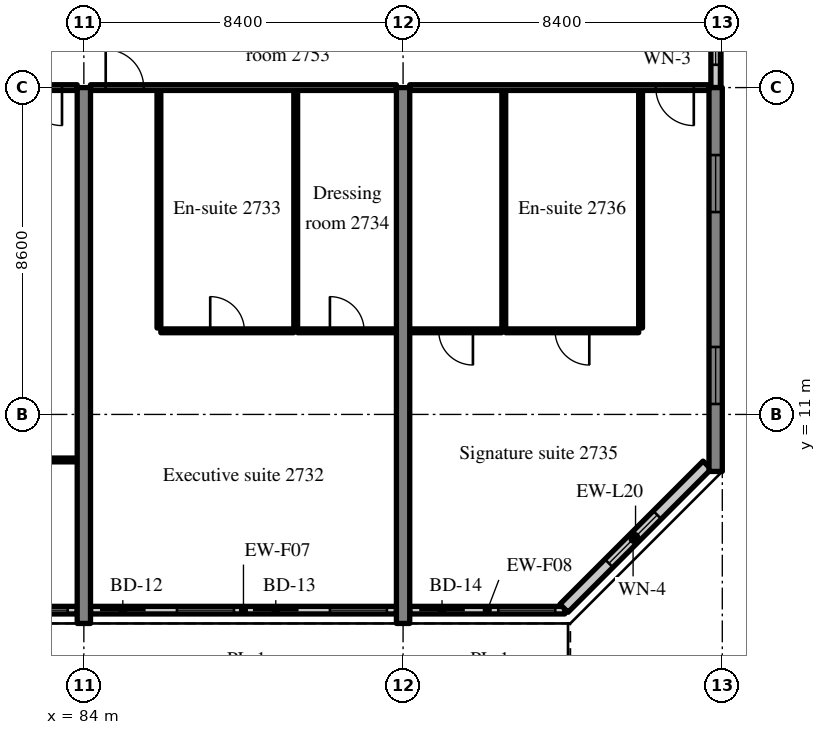
"""IFC4 building model, lengths in metres.
Left out: names, types, materials, properties, quantities, classifications, styles, units other than length and angle.
Written with IfcOpenShell. Run it as: python <this file> out.ifc"""

import sys

from ifc_helpers import new_model, si_unit, direction, frame, frame_2d, origin, place, context, subcontext, project, spatial, rectangle, extrude, source, transform, mapped, element, fill, save


model = new_model("IFC4")
c1 = context("Model", 3, precision=1e-05, world=origin(), true_north=direction((0.0, 1.0)))
c2 = subcontext(c1, "Body", "Model", "MODEL_VIEW")
j1 = project(units=[si_unit("LENGTHUNIT", "METRE"), si_unit("PLANEANGLEUNIT", "RADIAN")], contexts=[c1])
p1 = place(None, origin())
s1 = spatial("IfcSite", under=j1, at=p1, CompositionType="ELEMENT")
p2 = place(p1, origin())
s2 = spatial("IfcBuilding", under=s1, at=p2, CompositionType="ELEMENT")
p3 = place(p2, frame((0.0, 0.0, 114.2)))
s3 = spatial("IfcBuildingStorey", under=s2, at=p3, CompositionType="ELEMENT", Elevation=114.2)
m1 = source(origin(), c2, "Body", "SweptSolid", [
    extrude(rectangle(XDim=14.1, YDim=0.35, at=frame_2d((7.05, 0.0))), origin(), (0.0, 0.0, 1.0), 3.52),
])
for number, where, z_axis, x_axis in (
    (1, (84.0, 5.5, 0.0), (0.0, 0.0, 1.0), (0.0, 1.0, 0.0)),
    (2, (92.4, 5.5, 0.0), (0.0, 0.0, 1.0), (0.0, 1.0, 0.0)),
):
    element("IfcWall", number, at=place(p3, frame(where, z_axis=z_axis, x_axis=x_axis)), inside=s3, PredefinedType="SHEAR", context=c2, shape_type="MappedRepresentation", body=[
        mapped(m1, transform((0.0, 0.0, 0.0), scale=1.0)),
    ])
m2 = source(origin(), c2, "Body", "SweptSolid", [
    extrude(rectangle(XDim=10.1, YDim=0.35, at=frame_2d((5.05, 0.0))), origin(), (0.0, 0.0, 1.0), 3.52),
])
p4 = place(p3, frame((100.625, 9.5, 0.0), z_axis=(0.0, 0.0, 1.0), x_axis=(0.0, 1.0, 0.0)))
e3 = element("IfcWall", 3, at=p4, inside=s3, PredefinedType="SHEAR", context=c2, shape_type="MappedRepresentation", body=[
    mapped(m2, transform((0.0, 0.0, 0.0), scale=1.0)),
])
m3 = source(origin(), c2, "Body", "SweptSolid", [
    extrude(rectangle(XDim=1.5, YDim=1.5, at=frame_2d((0.75, 0.75))), frame((0.0, 0.185, 0.0), z_axis=(0.0, -1.0, 0.0), x_axis=(1.0, 0.0, 0.0)), (0.0, 0.0, 1.0), 0.37),
])
p5 = place(p4, frame((1.775, 0.0, 0.9)))
e4 = element("IfcOpeningElement", 4, at=p5, cuts=e3, PredefinedType="OPENING", context=c2, shape_type="MappedRepresentation", body=[
    mapped(m3, transform((0.0, 0.0, 0.0), scale=1.0)),
])
p6 = place(p4, frame((6.825, 0.0, 0.9)))
e5 = element("IfcOpeningElement", 5, at=p6, cuts=e3, PredefinedType="OPENING", context=c2, shape_type="MappedRepresentation", body=[
    mapped(m3, transform((0.0, 0.0, 0.0), scale=1.0)),
])
m4 = source(origin(), c2, "Body", "SweptSolid", [
    extrude(rectangle(XDim=8.05, YDim=0.2, at=frame_2d((4.025, 0.0))), origin(), (0.0, 0.0, 1.0), 2.82),
])
p7 = place(p3, frame((75.775, 5.85, 0.0), z_axis=(0.0, 0.0, 1.0), x_axis=(1.0, 0.0, 0.0)))
e6 = element("IfcWall", 6, at=p7, inside=s3, PredefinedType="SOLIDWALL", context=c2, shape_type="MappedRepresentation", body=[
    mapped(m4, transform((0.0, 0.0, 0.0), scale=1.0)),
])
m5 = source(origin(), c2, "Body", "SweptSolid", [
    extrude(rectangle(XDim=1.2, YDim=2.4, at=frame_2d((0.6, 1.2))), frame((0.0, 0.11, 0.0), z_axis=(0.0, -1.0, 0.0), x_axis=(1.0, 0.0, 0.0)), (0.0, 0.0, 1.0), 0.22),
])
p8 = place(p7, frame((0.25, 0.0, 0.0)))
e7 = element("IfcOpeningElement", 7, at=p8, cuts=e6, PredefinedType="OPENING", context=c2, shape_type="MappedRepresentation", body=[
    mapped(m5, transform((0.0, 0.0, 0.0), scale=1.0)),
])
m6 = source(origin(), c2, "Body", "SweptSolid", [
    extrude(rectangle(XDim=1.5, YDim=1.5, at=frame_2d((0.75, 0.75))), frame((0.0, 0.11, 0.0), z_axis=(0.0, -1.0, 0.0), x_axis=(1.0, 0.0, 0.0)), (0.0, 0.0, 1.0), 0.22),
])
p9 = place(p7, frame((2.275, 0.0, 0.9)))
e8 = element("IfcOpeningElement", 8, at=p9, cuts=e6, PredefinedType="OPENING", context=c2, shape_type="MappedRepresentation", body=[
    mapped(m6, transform((0.0, 0.0, 0.0), scale=1.0)),
])
p10 = place(p7, frame((4.275, 0.0, 0.0)))
e9 = element("IfcOpeningElement", 9, at=p10, cuts=e6, PredefinedType="OPENING", context=c2, shape_type="MappedRepresentation", body=[
    mapped(m5, transform((0.0, 0.0, 0.0), scale=1.0)),
])
p11 = place(p7, frame((6.3, 0.0, 0.9)))
e10 = element("IfcOpeningElement", 10, at=p11, cuts=e6, PredefinedType="OPENING", context=c2, shape_type="MappedRepresentation", body=[
    mapped(m6, transform((0.0, 0.0, 0.0), scale=1.0)),
])
p12 = place(p3, frame((84.175, 5.85, 0.0), z_axis=(0.0, 0.0, 1.0), x_axis=(1.0, 0.0, 0.0)))
e11 = element("IfcWall", 11, at=p12, inside=s3, PredefinedType="SOLIDWALL", context=c2, shape_type="MappedRepresentation", body=[
    mapped(m4, transform((0.0, 0.0, 0.0), scale=1.0)),
])
p13 = place(p12, frame((0.25, 0.0, 0.0)))
e12 = element("IfcOpeningElement", 12, at=p13, cuts=e11, PredefinedType="OPENING", context=c2, shape_type="MappedRepresentation", body=[
    mapped(m5, transform((0.0, 0.0, 0.0), scale=1.0)),
])
p14 = place(p12, frame((2.275, 0.0, 0.9)))
e13 = element("IfcOpeningElement", 13, at=p14, cuts=e11, PredefinedType="OPENING", context=c2, shape_type="MappedRepresentation", body=[
    mapped(m6, transform((0.0, 0.0, 0.0), scale=1.0)),
])
p15 = place(p12, frame((4.275, 0.0, 0.0)))
e14 = element("IfcOpeningElement", 14, at=p15, cuts=e11, PredefinedType="OPENING", context=c2, shape_type="MappedRepresentation", body=[
    mapped(m5, transform((0.0, 0.0, 0.0), scale=1.0)),
])
p16 = place(p12, frame((6.3, 0.0, 0.9)))
e15 = element("IfcOpeningElement", 15, at=p16, cuts=e11, PredefinedType="OPENING", context=c2, shape_type="MappedRepresentation", body=[
    mapped(m6, transform((0.0, 0.0, 0.0), scale=1.0)),
])
m7 = source(origin(), c2, "Body", "SweptSolid", [
    extrude(rectangle(XDim=4.08, YDim=0.2, at=frame_2d((2.04, 0.0))), origin(), (0.0, 0.0, 1.0), 2.82),
])
p17 = place(p3, frame((92.575, 5.85, 0.0), z_axis=(0.0, 0.0, 1.0), x_axis=(1.0, 0.0, 0.0)))
e16 = element("IfcWall", 16, at=p17, inside=s3, PredefinedType="SOLIDWALL", context=c2, shape_type="MappedRepresentation", body=[
    mapped(m7, transform((0.0, 0.0, 0.0), scale=1.0)),
])
p18 = place(p17, frame((0.25, 0.0, 0.0)))
e17 = element("IfcOpeningElement", 17, at=p18, cuts=e16, PredefinedType="OPENING", context=c2, shape_type="MappedRepresentation", body=[
    mapped(m5, transform((0.0, 0.0, 0.0), scale=1.0)),
])
p19 = place(p17, frame((2.33, 0.0, 0.9)))
e18 = element("IfcOpeningElement", 18, at=p19, cuts=e16, PredefinedType="OPENING", context=c2, shape_type="MappedRepresentation", body=[
    mapped(m6, transform((0.0, 0.0, 0.0), scale=1.0)),
])
m8 = source(origin(), c2, "Body", "SweptSolid", [
    extrude(rectangle(XDim=5.326, YDim=0.3, at=frame_2d((2.663, 0.0))), origin(), (0.0, 0.0, 1.0), 3.52),
])
p20 = place(p3, frame((96.634, 5.9, 0.0), z_axis=(0.0, 0.0, 1.0), x_axis=(0.707083859269, 0.707129702361, 0.0)))
e19 = element("IfcWall", 19, at=p20, inside=s3, PredefinedType="SOLIDWALL", context=c2, shape_type="MappedRepresentation", body=[
    mapped(m8, transform((0.0, 0.0, 0.0), scale=1.0)),
])
m9 = source(origin(), c2, "Body", "SweptSolid", [
    extrude(rectangle(XDim=1.8, YDim=1.5, at=frame_2d((0.9, 0.75))), frame((0.0, 0.16, 0.0), z_axis=(0.0, -1.0, 0.0), x_axis=(1.0, 0.0, 0.0)), (0.0, 0.0, 1.0), 0.32),
])
p21 = place(p20, frame((1.672, 0.0, 0.9)))
e20 = element("IfcOpeningElement", 20, at=p21, cuts=e19, PredefinedType="OPENING", context=c2, shape_type="MappedRepresentation", body=[
    mapped(m9, transform((0.0, 0.0, 0.0), scale=1.0)),
])
m10 = source(origin(), c2, "Body", "SweptSolid", [
    extrude(rectangle(XDim=2.4, YDim=0.25, at=frame_2d((1.2, 0.0))), origin(), (0.0, 0.0, 1.0), 2.62),
])
p22 = place(p3, frame((100.625, 19.6, 0.0), z_axis=(0.0, 0.0, 1.0), x_axis=(0.0, 1.0, 0.0)))
e21 = element("IfcWall", 21, at=p22, inside=s3, PredefinedType="SOLIDWALL", context=c2, shape_type="MappedRepresentation", body=[
    mapped(m10, transform((0.0, 0.0, 0.0), scale=1.0)),
])
m11 = source(origin(), c2, "Body", "SweptSolid", [
    extrude(rectangle(XDim=1.2, YDim=1.5, at=frame_2d((0.6, 0.75))), frame((0.0, 0.135, 0.0), z_axis=(0.0, -1.0, 0.0), x_axis=(1.0, 0.0, 0.0)), (0.0, 0.0, 1.0), 0.27),
])
p23 = place(p22, frame((0.6, 0.0, 0.9)))
e22 = element("IfcOpeningElement", 22, at=p23, cuts=e21, PredefinedType="OPENING", context=c2, shape_type="MappedRepresentation", body=[
    mapped(m11, transform((0.0, 0.0, 0.0), scale=1.0)),
])
m12 = source(origin(), c2, "Body", "SweptSolid", [
    extrude(rectangle(XDim=8.05, YDim=0.1, at=frame_2d((4.025, 0.0))), origin(), (0.0, 0.0, 1.0), 3.52),
])
p24 = place(p3, frame((75.775, 9.802, 0.0), z_axis=(0.0, 0.0, 1.0), x_axis=(1.0, 0.0, 0.0)))
e23 = element("IfcWall", 23, at=p24, inside=s3, PredefinedType="PARTITIONING", context=c2, shape_type="MappedRepresentation", body=[
    mapped(m12, transform((0.0, 0.0, 0.0), scale=1.0)),
])
m13 = source(origin(), c2, "Body", "SweptSolid", [
    extrude(rectangle(XDim=1.8, YDim=2.1, at=frame_2d((0.9, 1.05))), frame((0.0, 0.06, 0.0), z_axis=(0.0, -1.0, 0.0), x_axis=(1.0, 0.0, 0.0)), (0.0, 0.0, 1.0), 0.12),
])
p25 = place(p24, frame((3.125, 0.0, 0.0)))
e24 = element("IfcOpeningElement", 24, at=p25, cuts=e23, PredefinedType="OPENING", context=c2, shape_type="MappedRepresentation", body=[
    mapped(m13, transform((0.0, 0.0, 0.0), scale=1.0)),
])
m14 = source(origin(), c2, "Body", "SweptSolid", [
    extrude(rectangle(XDim=8.05, YDim=0.15, at=frame_2d((4.025, 0.0))), origin(), (0.0, 0.0, 1.0), 2.82),
])
p26 = place(p3, frame((75.775, 19.6, 0.0), z_axis=(0.0, 0.0, 1.0), x_axis=(1.0, 0.0, 0.0)))
e25 = element("IfcWall", 25, at=p26, inside=s3, PredefinedType="PARTITIONING", context=c2, shape_type="MappedRepresentation", body=[
    mapped(m14, transform((0.0, 0.0, 0.0), scale=1.0)),
])
m15 = source(origin(), c2, "Body", "SweptSolid", [
    extrude(rectangle(XDim=1.0, YDim=2.1, at=frame_2d((0.5, 1.05))), frame((0.0, 0.085, 0.0), z_axis=(0.0, -1.0, 0.0), x_axis=(1.0, 0.0, 0.0)), (0.0, 0.0, 1.0), 0.17),
])
p27 = place(p26, frame((6.65, 0.0, 0.0)))
e26 = element("IfcOpeningElement", 26, at=p27, cuts=e25, PredefinedType="OPENING", context=c2, shape_type="MappedRepresentation", body=[
    mapped(m15, transform((0.0, 0.0, 0.0), scale=1.0)),
])
m16 = source(origin(), c2, "Body", "SweptSolid", [
    extrude(rectangle(XDim=6.25, YDim=0.1, at=frame_2d((3.125, 0.0))), origin(), (0.0, 0.0, 1.0), 3.52),
])
for number, where, z_axis, x_axis in (
    (27, (85.975, 13.275, 0.0), (0.0, 0.0, 1.0), (0.0, 1.0, 0.0)),
    (28, (89.575, 13.275, 0.0), (0.0, 0.0, 1.0), (0.0, 1.0, 0.0)),
):
    element("IfcWall", number, at=place(p3, frame(where, z_axis=z_axis, x_axis=x_axis)), inside=s3, PredefinedType="PARTITIONING", context=c2, shape_type="MappedRepresentation", body=[
        mapped(m16, transform((0.0, 0.0, 0.0), scale=1.0)),
    ])
m17 = source(origin(), c2, "Body", "SweptSolid", [
    extrude(rectangle(XDim=3.5, YDim=0.1, at=frame_2d((1.75, 0.0))), origin(), (0.0, 0.0, 1.0), 3.52),
])
p28 = place(p3, frame((86.025, 13.2, 0.0), z_axis=(0.0, 0.0, 1.0), x_axis=(1.0, 0.0, 0.0)))
e29 = element("IfcWall", 29, at=p28, inside=s3, PredefinedType="PARTITIONING", context=c2, shape_type="MappedRepresentation", body=[
    mapped(m17, transform((0.0, 0.0, 0.0), scale=1.0)),
])
m18 = source(origin(), c2, "Body", "SweptSolid", [
    extrude(rectangle(XDim=0.9, YDim=2.1, at=frame_2d((0.45, 1.05))), frame((0.0, 0.06, 0.0), z_axis=(0.0, -1.0, 0.0), x_axis=(1.0, 0.0, 0.0)), (0.0, 0.0, 1.0), 0.12),
])
p29 = place(p28, frame((1.3, 0.0, 0.0)))
e30 = element("IfcOpeningElement", 30, at=p29, cuts=e29, PredefinedType="OPENING", context=c2, shape_type="MappedRepresentation", body=[
    mapped(m18, transform((0.0, 0.0, 0.0), scale=1.0)),
])
m19 = source(origin(), c2, "Body", "SweptSolid", [
    extrude(rectangle(XDim=2.6, YDim=0.1, at=frame_2d((1.3, 0.0))), origin(), (0.0, 0.0, 1.0), 3.52),
])
p30 = place(p3, frame((89.625, 13.2, 0.0), z_axis=(0.0, 0.0, 1.0), x_axis=(1.0, 0.0, 0.0)))
e31 = element("IfcWall", 31, at=p30, inside=s3, PredefinedType="PARTITIONING", context=c2, shape_type="MappedRepresentation", body=[
    mapped(m19, transform((0.0, 0.0, 0.0), scale=1.0)),
])
p31 = place(p30, frame((0.85, 0.0, 0.0)))
e32 = element("IfcOpeningElement", 32, at=p31, cuts=e31, PredefinedType="OPENING", context=c2, shape_type="MappedRepresentation", body=[
    mapped(m18, transform((0.0, 0.0, 0.0), scale=1.0)),
])
p32 = place(p3, frame((84.175, 19.6, 0.0), z_axis=(0.0, 0.0, 1.0), x_axis=(1.0, 0.0, 0.0)))
e33 = element("IfcWall", 33, at=p32, inside=s3, PredefinedType="PARTITIONING", context=c2, shape_type="MappedRepresentation", body=[
    mapped(m14, transform((0.0, 0.0, 0.0), scale=1.0)),
])
p33 = place(p32, frame((0.4, 0.0, 0.0)))
e34 = element("IfcOpeningElement", 34, at=p33, cuts=e33, PredefinedType="OPENING", context=c2, shape_type="MappedRepresentation", body=[
    mapped(m15, transform((0.0, 0.0, 0.0), scale=1.0)),
])
for number, where, z_axis, x_axis in (
    (35, (98.65, 13.275, 0.0), (0.0, 0.0, 1.0), (0.0, 1.0, 0.0)),
    (36, (95.05, 13.275, 0.0), (0.0, 0.0, 1.0), (0.0, 1.0, 0.0)),
):
    element("IfcWall", number, at=place(p3, frame(where, z_axis=z_axis, x_axis=x_axis)), inside=s3, PredefinedType="PARTITIONING", context=c2, shape_type="MappedRepresentation", body=[
        mapped(m16, transform((0.0, 0.0, 0.0), scale=1.0)),
    ])
p34 = place(p3, frame((95.1, 13.2, 0.0), z_axis=(0.0, 0.0, 1.0), x_axis=(1.0, 0.0, 0.0)))
e37 = element("IfcWall", 37, at=p34, inside=s3, PredefinedType="PARTITIONING", context=c2, shape_type="MappedRepresentation", body=[
    mapped(m17, transform((0.0, 0.0, 0.0), scale=1.0)),
])
p35 = place(p34, frame((1.3, 0.0, 0.0)))
e38 = element("IfcOpeningElement", 38, at=p35, cuts=e37, PredefinedType="OPENING", context=c2, shape_type="MappedRepresentation", body=[
    mapped(m18, transform((0.0, 0.0, 0.0), scale=1.0)),
])
m20 = source(origin(), c2, "Body", "SweptSolid", [
    extrude(rectangle(XDim=2.425, YDim=0.1, at=frame_2d((1.212, 0.0))), origin(), (0.0, 0.0, 1.0), 3.52),
])
p36 = place(p3, frame((92.575, 13.2, 0.0), z_axis=(0.0, 0.0, 1.0), x_axis=(1.0, 0.0, 0.0)))
e39 = element("IfcWall", 39, at=p36, inside=s3, PredefinedType="PARTITIONING", context=c2, shape_type="MappedRepresentation", body=[
    mapped(m20, transform((0.0, 0.0, 0.0), scale=1.0)),
])
p37 = place(p36, frame((0.763, 0.0, 0.0)))
e40 = element("IfcOpeningElement", 40, at=p37, cuts=e39, PredefinedType="OPENING", context=c2, shape_type="MappedRepresentation", body=[
    mapped(m18, transform((0.0, 0.0, 0.0), scale=1.0)),
])
m21 = source(origin(), c2, "Body", "SweptSolid", [
    extrude(rectangle(XDim=7.875, YDim=0.15, at=frame_2d((3.938, 0.0))), origin(), (0.0, 0.0, 1.0), 2.82),
])
p38 = place(p3, frame((92.575, 19.6, 0.0), z_axis=(0.0, 0.0, 1.0), x_axis=(1.0, 0.0, 0.0)))
e41 = element("IfcWall", 41, at=p38, inside=s3, PredefinedType="PARTITIONING", context=c2, shape_type="MappedRepresentation", body=[
    mapped(m21, transform((0.0, 0.0, 0.0), scale=1.0)),
])
p39 = place(p38, frame((6.475, 0.0, 0.0)))
e42 = element("IfcOpeningElement", 42, at=p39, cuts=e41, PredefinedType="OPENING", context=c2, shape_type="MappedRepresentation", body=[
    mapped(m15, transform((0.0, 0.0, 0.0), scale=1.0)),
])
m22 = source(origin(), c2, "Body", "SweptSolid", [
    extrude(rectangle(XDim=1.5, YDim=1.5, at=frame_2d((0.75, 0.75))), frame((0.0, 0.03, 0.0), z_axis=(0.0, -1.0, 0.0), x_axis=(1.0, 0.0, 0.0)), (0.0, 0.0, 1.0), 0.06),
])
p40 = place(p11, origin())
e43 = element("IfcWindow", 43, at=p40, inside=s3, PartitioningType="SINGLE_PANEL", PredefinedType="WINDOW", context=c2, shape_type="MappedRepresentation", body=[
    mapped(m22, transform((0.0, 0.0, 0.0), scale=1.0)),
])
fill(e10, e43)
m23 = source(origin(), c2, "Body", "SweptSolid", [
    extrude(rectangle(XDim=1.2, YDim=2.4, at=frame_2d((0.6, 1.2))), frame((0.0, 0.025, 0.0), z_axis=(0.0, -1.0, 0.0), x_axis=(1.0, 0.0, 0.0)), (0.0, 0.0, 1.0), 0.05),
])
p41 = place(p13, origin())
e44 = element("IfcDoor", 44, at=p41, inside=s3, OperationType="SLIDING_TO_RIGHT", PredefinedType="DOOR", context=c2, shape_type="MappedRepresentation", body=[
    mapped(m23, transform((0.0, 0.0, 0.0), scale=1.0)),
])
fill(e12, e44)
p42 = place(p14, origin())
e45 = element("IfcWindow", 45, at=p42, inside=s3, PartitioningType="SINGLE_PANEL", PredefinedType="WINDOW", context=c2, shape_type="MappedRepresentation", body=[
    mapped(m22, transform((0.0, 0.0, 0.0), scale=1.0)),
])
fill(e13, e45)
p43 = place(p15, origin())
e46 = element("IfcDoor", 46, at=p43, inside=s3, OperationType="SLIDING_TO_LEFT", PredefinedType="DOOR", context=c2, shape_type="MappedRepresentation", body=[
    mapped(m23, transform((0.0, 0.0, 0.0), scale=1.0)),
])
fill(e14, e46)
p44 = place(p16, origin())
e47 = element("IfcWindow", 47, at=p44, inside=s3, PartitioningType="SINGLE_PANEL", PredefinedType="WINDOW", context=c2, shape_type="MappedRepresentation", body=[
    mapped(m22, transform((0.0, 0.0, 0.0), scale=1.0)),
])
fill(e15, e47)
p45 = place(p18, origin())
e48 = element("IfcDoor", 48, at=p45, inside=s3, OperationType="SLIDING_TO_RIGHT", PredefinedType="DOOR", context=c2, shape_type="MappedRepresentation", body=[
    mapped(m23, transform((0.0, 0.0, 0.0), scale=1.0)),
])
fill(e17, e48)
p46 = place(p19, origin())
e49 = element("IfcWindow", 49, at=p46, inside=s3, PartitioningType="SINGLE_PANEL", PredefinedType="WINDOW", context=c2, shape_type="MappedRepresentation", body=[
    mapped(m22, transform((0.0, 0.0, 0.0), scale=1.0)),
])
fill(e18, e49)
m24 = source(origin(), c2, "Body", "SweptSolid", [
    extrude(rectangle(XDim=1.8, YDim=1.5, at=frame_2d((0.9, 0.75))), frame((0.0, 0.03, 0.0), z_axis=(0.0, -1.0, 0.0), x_axis=(1.0, 0.0, 0.0)), (0.0, 0.0, 1.0), 0.06),
])
p47 = place(p21, origin())
e50 = element("IfcWindow", 50, at=p47, inside=s3, PartitioningType="SINGLE_PANEL", PredefinedType="WINDOW", context=c2, shape_type="MappedRepresentation", body=[
    mapped(m24, transform((0.0, 0.0, 0.0), scale=1.0)),
])
fill(e20, e50)
p48 = place(p5, origin())
e51 = element("IfcWindow", 51, at=p48, inside=s3, PartitioningType="SINGLE_PANEL", PredefinedType="WINDOW", context=c2, shape_type="MappedRepresentation", body=[
    mapped(m22, transform((0.0, 0.0, 0.0), scale=1.0)),
])
fill(e4, e51)
p49 = place(p6, origin())
e52 = element("IfcWindow", 52, at=p49, inside=s3, PartitioningType="SINGLE_PANEL", PredefinedType="WINDOW", context=c2, shape_type="MappedRepresentation", body=[
    mapped(m22, transform((0.0, 0.0, 0.0), scale=1.0)),
])
fill(e5, e52)
m25 = source(origin(), c2, "Body", "SweptSolid", [
    extrude(rectangle(XDim=1.2, YDim=1.5, at=frame_2d((0.6, 0.75))), frame((0.0, 0.03, 0.0), z_axis=(0.0, -1.0, 0.0), x_axis=(1.0, 0.0, 0.0)), (0.0, 0.0, 1.0), 0.06),
])
p50 = place(p23, origin())
e53 = element("IfcWindow", 53, at=p50, inside=s3, PartitioningType="SINGLE_PANEL", PredefinedType="WINDOW", context=c2, shape_type="MappedRepresentation", body=[
    mapped(m25, transform((0.0, 0.0, 0.0), scale=1.0)),
])
fill(e22, e53)
m26 = source(origin(), c2, "Body", "SweptSolid", [
    extrude(rectangle(XDim=1.0, YDim=2.1, at=frame_2d((0.5, 1.05))), frame((0.0, 0.025, 0.0), z_axis=(0.0, -1.0, 0.0), x_axis=(1.0, 0.0, 0.0)), (0.0, 0.0, 1.0), 0.05),
])
p51 = place(p27, origin())
e54 = element("IfcDoor", 54, at=p51, inside=s3, OperationType="SINGLE_SWING_RIGHT", PredefinedType="DOOR", context=c2, shape_type="MappedRepresentation", body=[
    mapped(m26, transform((0.0, 0.0, 0.0), scale=1.0)),
])
fill(e26, e54)
m27 = source(origin(), c2, "Body", "SweptSolid", [
    extrude(rectangle(XDim=0.9, YDim=2.1, at=frame_2d((0.45, 1.05))), frame((0.0, 0.025, 0.0), z_axis=(0.0, -1.0, 0.0), x_axis=(1.0, 0.0, 0.0)), (0.0, 0.0, 1.0), 0.05),
])
p52 = place(p29, origin())
e55 = element("IfcDoor", 55, at=p52, inside=s3, OperationType="SINGLE_SWING_LEFT", PredefinedType="DOOR", context=c2, shape_type="MappedRepresentation", body=[
    mapped(m27, transform((0.0, 0.0, 0.0), scale=1.0)),
])
fill(e30, e55)
p53 = place(p31, origin())
e56 = element("IfcDoor", 56, at=p53, inside=s3, OperationType="SINGLE_SWING_LEFT", PredefinedType="DOOR", context=c2, shape_type="MappedRepresentation", body=[
    mapped(m27, transform((0.0, 0.0, 0.0), scale=1.0)),
])
fill(e32, e56)
p54 = place(p33, origin())
e57 = element("IfcDoor", 57, at=p54, inside=s3, OperationType="SINGLE_SWING_LEFT", PredefinedType="DOOR", context=c2, shape_type="MappedRepresentation", body=[
    mapped(m26, transform((0.0, 0.0, 0.0), scale=1.0)),
])
fill(e34, e57)
p55 = place(p35, origin())
e58 = element("IfcDoor", 58, at=p55, inside=s3, OperationType="SINGLE_SWING_RIGHT", PredefinedType="DOOR", context=c2, shape_type="MappedRepresentation", body=[
    mapped(m27, transform((0.0, 0.0, 0.0), scale=1.0)),
])
fill(e38, e58)
p56 = place(p37, origin())
e59 = element("IfcDoor", 59, at=p56, inside=s3, OperationType="SINGLE_SWING_RIGHT", PredefinedType="DOOR", context=c2, shape_type="MappedRepresentation", body=[
    mapped(m27, transform((0.0, 0.0, 0.0), scale=1.0)),
])
fill(e40, e59)
p57 = place(p39, origin())
e60 = element("IfcDoor", 60, at=p57, inside=s3, OperationType="SINGLE_SWING_RIGHT", PredefinedType="DOOR", context=c2, shape_type="MappedRepresentation", body=[
    mapped(m26, transform((0.0, 0.0, 0.0), scale=1.0)),
])
fill(e42, e60)
save(model, sys.argv[1])
